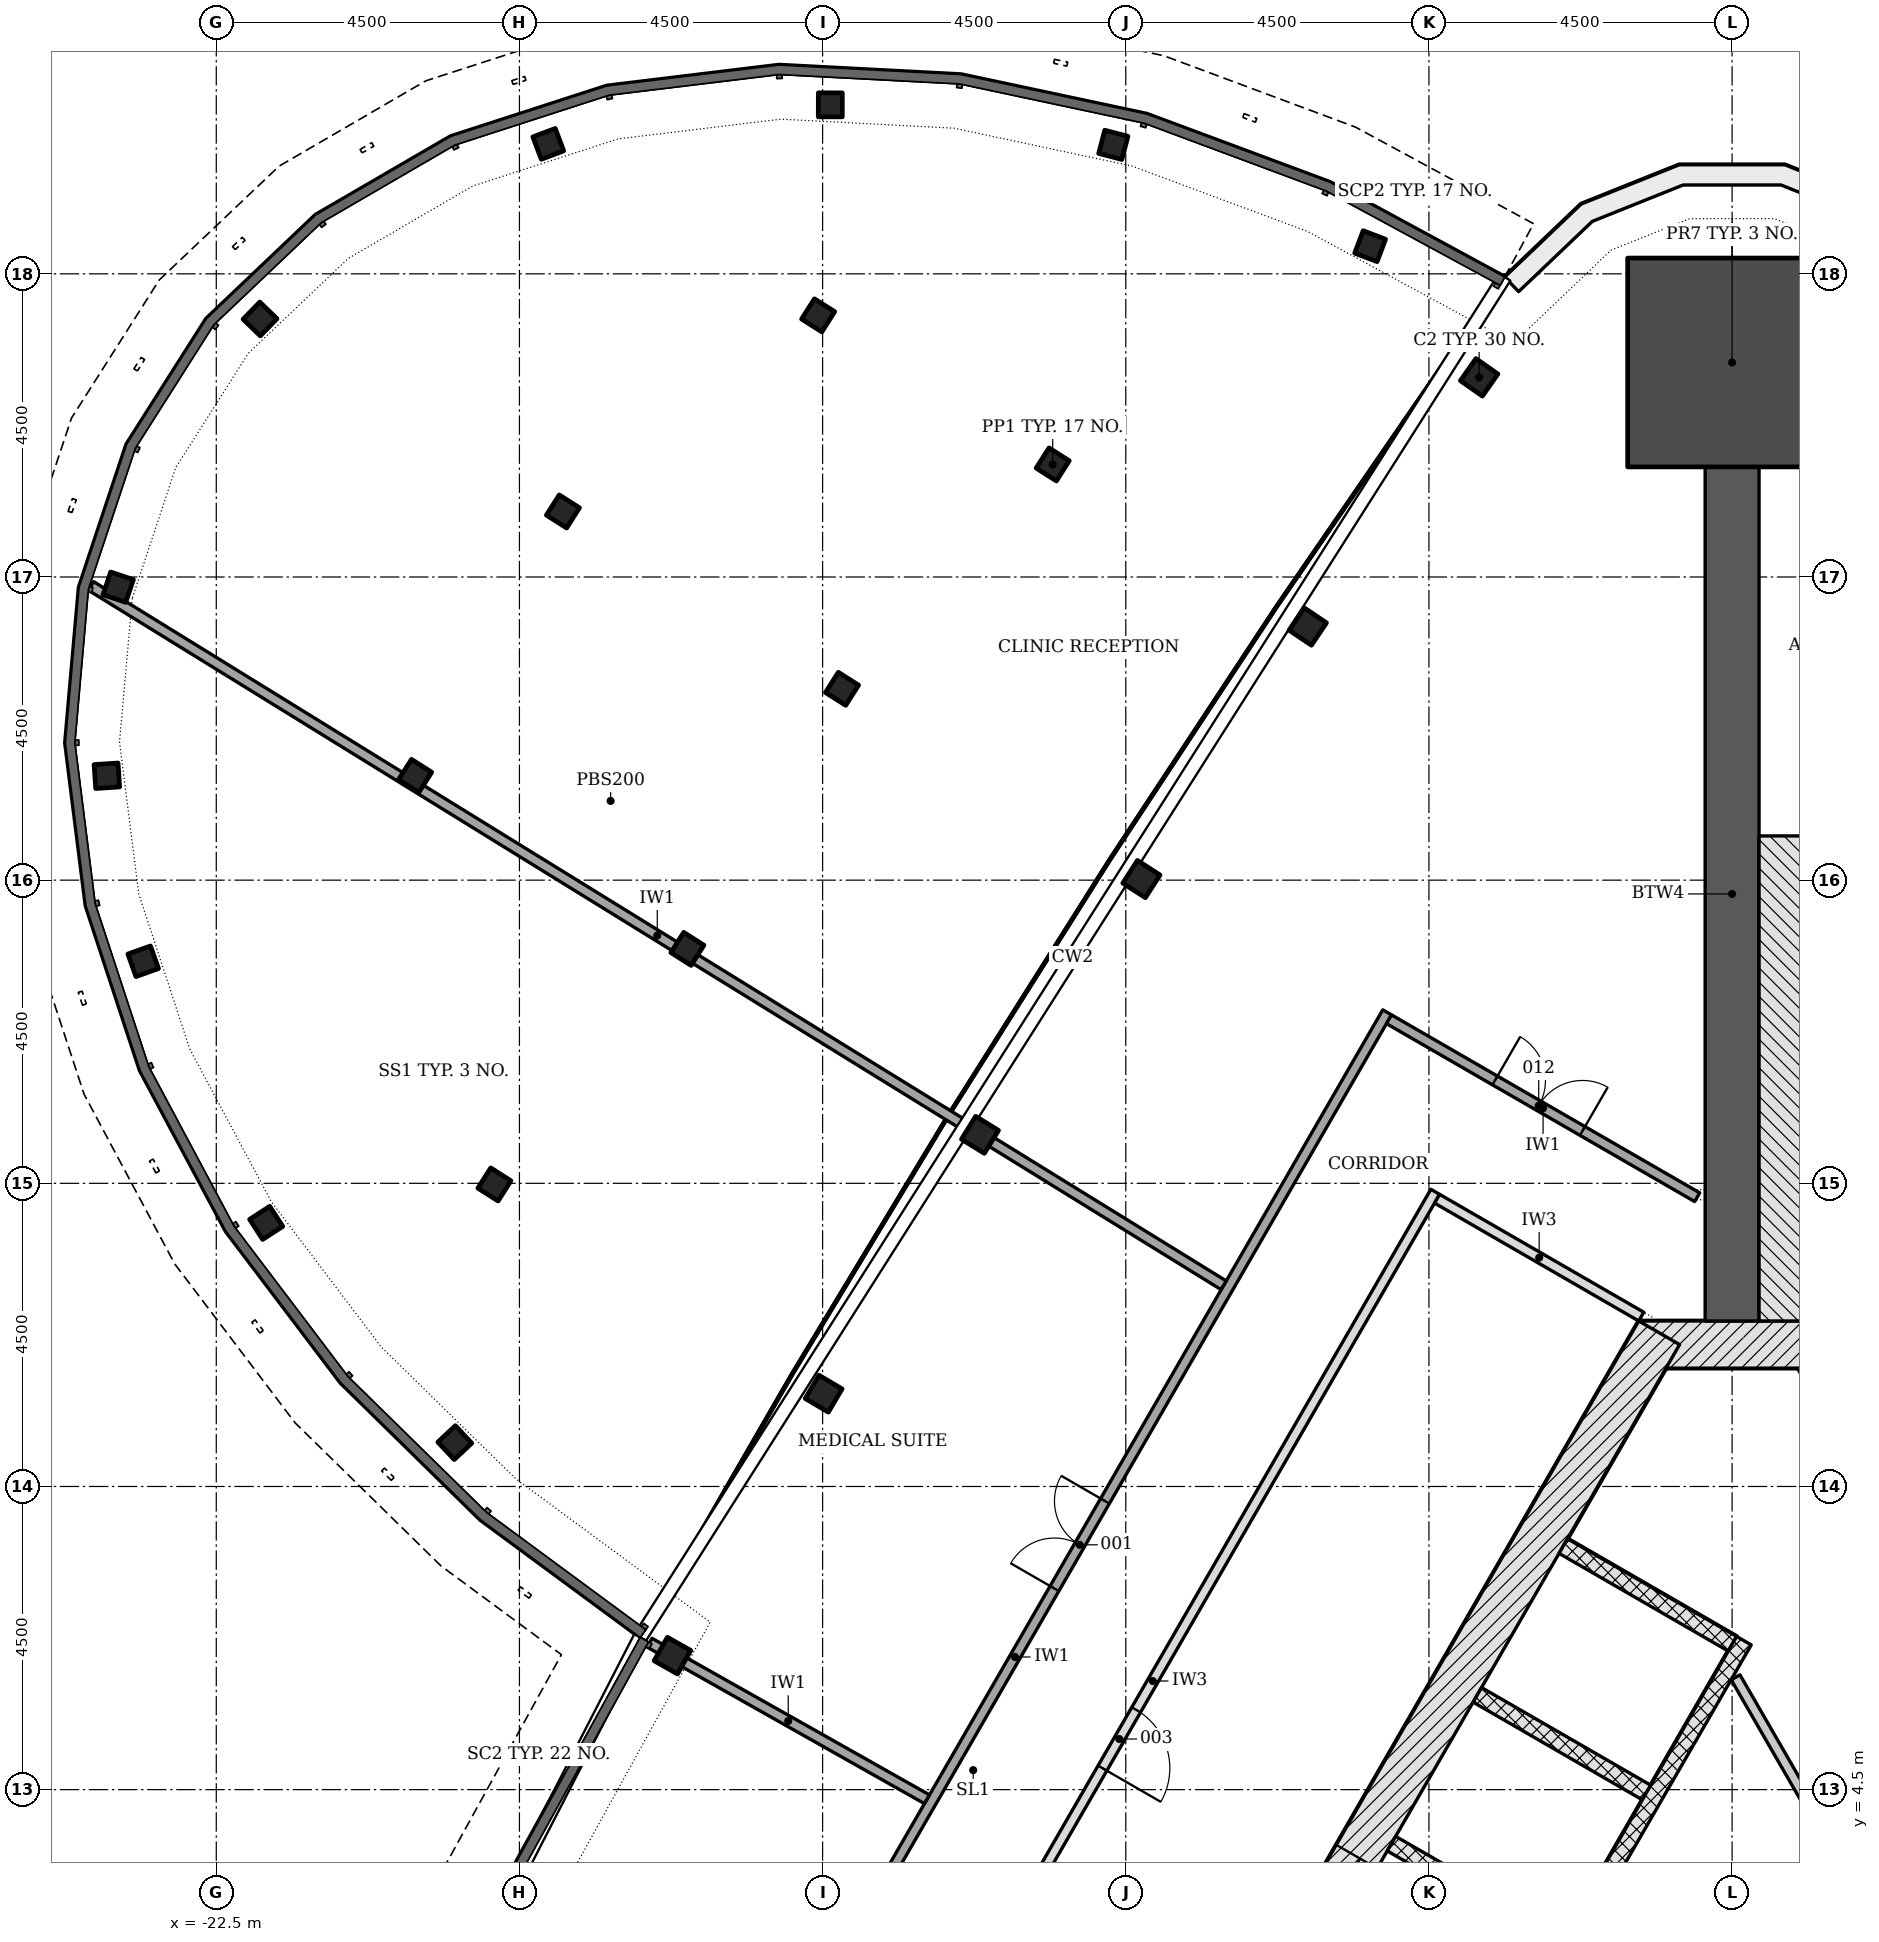
"""IFC4 building model, lengths in metres.
Left out: names, types, materials, properties, quantities, classifications, styles, units other than length and angle.
Written with IfcOpenShell. Run it as: python <this file> out.ifc"""

import sys

from ifc_helpers import new_model, si_unit, direction, frame, frame_2d, origin, origin_2d, place, context, subcontext, project, spatial, polyline, rectangle, hollow_rectangle, i_section, outline, extrude, element, fill, save


model = new_model("IFC4")
c1 = context("Model", 3, precision=1e-05, world=origin(), true_north=direction((0.0, 1.0)))
c2 = subcontext(c1, "Body", "Model", "MODEL_VIEW")
j1 = project(units=[si_unit("LENGTHUNIT", "METRE"), si_unit("PLANEANGLEUNIT", "RADIAN")], contexts=[c1])
p1 = place(None, origin())
s1 = spatial("IfcSite", under=j1, at=p1, CompositionType="ELEMENT")
p2 = place(p1, origin())
s2 = spatial("IfcBuilding", under=s1, at=p2, CompositionType="ELEMENT")
p3 = place(p2, frame((0.0, 0.0, 91.5)))
s3 = spatial("IfcBuildingStorey", under=s2, at=p3, CompositionType="ELEMENT", Elevation=91.5)
p4 = place(p3, frame((10.311, -4.703, -0.2), z_axis=(0.0, 0.0, 1.0), x_axis=(-0.500001446645, 0.866024568562, 0.0)))
e1 = element("IfcWall", 1, at=p4, inside=s3, PredefinedType="SHEAR", context=c2, shape_type="SweptSolid", body=[
    extrude(rectangle(XDim=18.458, YDim=0.7, at=frame_2d((9.229, 0.0))), origin(), (0.0, 0.0, 1.0), 3.6),
])
p5 = place(p4, frame((8.7, 0.0, 0.2)))
e2 = element("IfcOpeningElement", 2, at=p5, cuts=e1, PredefinedType="OPENING", context=c2, shape_type="SweptSolid", body=[
    extrude(rectangle(XDim=1.0, YDim=2.1, at=frame_2d((0.5, 1.05))), frame((0.0, 0.36, 0.0), z_axis=(0.0, -1.0, 0.0), x_axis=(1.0, 0.0, 0.0)), (0.0, 0.0, 1.0), 0.72),
])
p6 = place(p4, frame((3.99, 0.0, 0.2)))
e3 = element("IfcOpeningElement", 3, at=p6, cuts=e1, PredefinedType="OPENING", context=c2, shape_type="SweptSolid", body=[
    extrude(rectangle(XDim=0.9, YDim=2.1, at=frame_2d((0.45, 1.05))), frame((0.0, 0.36, 0.0), z_axis=(0.0, -1.0, 0.0), x_axis=(1.0, 0.0, 0.0)), (0.0, 0.0, 1.0), 0.72),
])
p7 = place(p4, frame((13.539, 0.0, 0.2)))
e4 = element("IfcOpeningElement", 4, at=p7, cuts=e1, PredefinedType="OPENING", context=c2, shape_type="SweptSolid", body=[
    extrude(rectangle(XDim=0.9, YDim=2.1, at=frame_2d((0.45, 1.05))), frame((0.0, 0.36, 0.0), z_axis=(0.0, -1.0, 0.0), x_axis=(1.0, 0.0, 0.0)), (0.0, 0.0, 1.0), 0.72),
])
p8 = place(p3, frame((1.386, 11.106, -0.2), z_axis=(0.0, 0.0, 1.0), x_axis=(-1.0, 0.0, 0.0)))
e5 = element("IfcWall", 5, at=p8, inside=s3, PredefinedType="SHEAR", context=c2, shape_type="SweptSolid", body=[
    extrude(rectangle(XDim=2.771, YDim=0.7, at=frame_2d((1.386, 0.0))), origin(), (0.0, 0.0, 1.0), 3.6),
])
p9 = place(p3, frame((-1.083, 11.281, -0.2), z_axis=(0.0, 0.0, 1.0), x_axis=(-0.500001446645, -0.866024568562, 0.0)))
e6 = element("IfcWall", 6, at=p9, inside=s3, PredefinedType="SHEAR", context=c2, shape_type="SweptSolid", body=[
    extrude(rectangle(XDim=18.458, YDim=0.7, at=frame_2d((9.229, 0.0))), origin(), (0.0, 0.0, 1.0), 3.6),
])
p10 = place(p9, frame((8.979, 0.0, 0.2)))
e7 = element("IfcOpeningElement", 7, at=p10, cuts=e6, PredefinedType="OPENING", context=c2, shape_type="SweptSolid", body=[
    extrude(rectangle(XDim=1.2, YDim=2.1, at=frame_2d((0.6, 1.05))), frame((0.0, 0.36, 0.0), z_axis=(0.0, -1.0, 0.0), x_axis=(1.0, 0.0, 0.0)), (0.0, 0.0, 1.0), 0.72),
])
p11 = place(p9, frame((11.029, 0.0, 0.2)))
e8 = element("IfcOpeningElement", 8, at=p11, cuts=e6, PredefinedType="OPENING", context=c2, shape_type="SweptSolid", body=[
    extrude(rectangle(XDim=1.2, YDim=2.1, at=frame_2d((0.6, 1.05))), frame((0.0, 0.36, 0.0), z_axis=(0.0, -1.0, 0.0), x_axis=(1.0, 0.0, 0.0)), (0.0, 0.0, 1.0), 0.72),
])
p12 = place(p3, frame((0.0, 11.456, -0.2), z_axis=(0.0, 0.0, 1.0), x_axis=(0.0, 1.0, 0.0)))
e9 = element("IfcWall", 9, at=p12, inside=s3, PredefinedType="SHEAR", context=c2, shape_type="SweptSolid", body=[
    extrude(rectangle(XDim=12.678, YDim=0.8, at=frame_2d((6.339, 0.0))), origin(), (0.0, 0.0, 1.0), 3.6),
])
p13 = place(p3, frame((0.0, 25.684, -0.2), z_axis=(0.0, 0.0, 1.0), x_axis=(0.0, 1.0, 0.0)))
e10 = element("IfcColumn", 10, at=p13, inside=s3, PredefinedType="COLUMN", context=c2, shape_type="SweptSolid", body=[
    extrude(rectangle(XDim=3.1, YDim=3.1, at=origin_2d()), origin(), (0.0, 0.0, 1.0), 3.6),
])
for number, where, z_axis, x_axis in (
    (11, (-3.755, 25.464, -0.2), (0.0, 0.0, 1.0), (-0.575, -0.818, 0.0)),
    (12, (-6.298, 21.765, -0.2), (0.0, 0.0, 1.0), (-0.558, -0.83, 0.0)),
    (13, (-8.768, 18.016, -0.2), (0.0, 0.0, 1.0), (-0.542, -0.84, 0.0)),
    (14, (-11.164, 14.22, -0.2), (0.0, 0.0, 1.0), (-0.525, -0.851, 0.0)),
    (15, (-13.484, 10.377, -0.2), (0.0, 0.0, 1.0), (-0.508, -0.861, 0.0)),
    (16, (-15.729, 6.49, -0.2), (0.0, 0.0, 1.0), (-0.491, -0.871, 0.0)),
):
    element("IfcColumn", number, at=place(p3, frame(where, z_axis=z_axis, x_axis=x_axis)), inside=s3, PredefinedType="COLUMN", context=c2, shape_type="SweptSolid", body=[
        extrude(i_section(OverallWidth=0.401, OverallDepth=0.399, WebThickness=0.025, FlangeThickness=0.04, FilletRadius=0.015, at=origin_2d()), origin(), (0.0, 0.0, 1.0), 3.6),
    ])
for number, where, z_axis, x_axis in (
    (17, (-10.084, 24.171, -0.2), (0.0, 0.0, 1.0), (-0.844, 0.536, 0.0)),
    (18, (-13.566, 26.384, -0.2), (0.0, 0.0, 1.0), (-0.844, 0.536, 0.0)),
    (19, (-13.212, 20.84, -0.2), (0.0, 0.0, 1.0), (-0.844, 0.536, 0.0)),
    (20, (-17.354, 23.473, -0.2), (0.0, 0.0, 1.0), (-0.844, 0.536, 0.0)),
    (21, (-15.507, 16.98, -0.2), (0.0, 0.0, 1.0), (-0.844, 0.536, 0.0)),
    (22, (-19.548, 19.548, -0.2), (0.0, 0.0, 1.0), (-0.844, 0.536, 0.0)),
    (23, (-18.372, 13.483, -0.2), (0.0, 0.0, 1.0), (-0.844, 0.536, 0.0)),
    (24, (-5.373, 27.41, -0.2), (0.0, 0.0, 1.0), (-0.935, 0.355, 0.0)),
    (25, (-9.185, 28.915, -0.2), (0.0, 0.0, 1.0), (-0.967, 0.253, 0.0)),
    (26, (-13.386, 29.509, -0.2), (0.0, 0.0, 1.0), (-1.0, 0.002, 0.0)),
    (27, (-17.572, 28.929, -0.2), (0.0, 0.0, 1.0), (-0.936, -0.352, 0.0)),
    (28, (-21.851, 26.33, -0.2), (0.0, 0.0, 1.0), (-0.696, -0.718, 0.0)),
    (29, (-23.956, 22.349, -0.2), (0.0, 0.0, 1.0), (-0.318, -0.948, 0.0)),
    (30, (-24.124, 19.55, -0.2), (0.0, 0.0, 1.0), (0.067, -0.998, 0.0)),
    (31, (-23.585, 16.796, -0.2), (0.0, 0.0, 1.0), (0.336, -0.942, 0.0)),
    (32, (-21.759, 12.913, -0.2), (0.0, 0.0, 1.0), (0.543, -0.839, 0.0)),
    (33, (-18.959, 9.651, -0.2), (0.0, 0.0, 1.0), (0.684, -0.73, 0.0)),
):
    element("IfcColumn", number, at=place(p3, frame(where, z_axis=z_axis, x_axis=x_axis)), inside=s3, PredefinedType="COLUMN", context=c2, shape_type="SweptSolid", body=[
        extrude(hollow_rectangle(XDim=0.356, YDim=0.356, WallThickness=0.013, at=origin_2d()), origin(), (0.0, 0.0, 1.0), 3.6),
    ])
p14 = place(p3, origin())
e34 = element("IfcWall", 34, at=p14, inside=s3, PredefinedType="NOTDEFINED", context=c2, shape_type="SweptSolid", body=[
    extrude(outline(polyline([(4.205, 25.78), (3.375, 26.953), (2.24, 28.035), (0.784, 28.619), (-0.784, 28.619), (-2.24, 28.035), (-3.375, 26.953), (-3.168, 26.736), (-2.075, 27.779), (-0.727, 28.319), (0.727, 28.319), (2.075, 27.779), (3.147, 26.756), (3.96, 25.606), (4.205, 25.78)])), origin(), (0.0, 0.0, 1.0), 3.3),
])
p15 = place(p3, frame((-2.506, 8.115, -0.2), z_axis=(0.0, 0.0, 1.0), x_axis=(0.865996321171, -0.50005036918, 0.0)))
e35 = element("IfcWall", 35, at=p15, inside=s3, PredefinedType="PARTITIONING", context=c2, shape_type="SweptSolid", body=[
    extrude(rectangle(XDim=2.9, YDim=0.25, at=frame_2d((1.45, 0.0))), origin(), (0.0, 0.0, 1.0), 3.6),
])
for number, where, z_axis, x_axis in (
    (36, (-3.781, 5.907, -0.2), (0.0, 0.0, 1.0), (0.866, -0.5, 0.0)),
    (37, (-5.056, 3.699, -0.2), (0.0, 0.0, 1.0), (0.866, -0.5, 0.0)),
):
    element("IfcWall", number, at=place(p3, frame(where, z_axis=z_axis, x_axis=x_axis)), inside=s3, PredefinedType="PARTITIONING", context=c2, shape_type="SweptSolid", body=[
        extrude(rectangle(XDim=2.9, YDim=0.25, at=frame_2d((1.45, 0.0))), origin(), (0.0, 0.0, 1.0), 3.6),
    ])
p16 = place(p3, frame((0.176, 6.711, 0.0), z_axis=(0.0, 0.0, 1.0), x_axis=(-0.500004227369, -0.866022963098, 0.0)))
e38 = element("IfcWall", 38, at=p16, inside=s3, PredefinedType="PARTITIONING", context=c2, shape_type="SweptSolid", body=[
    extrude(rectangle(XDim=11.8, YDim=0.25, at=frame_2d((5.9, 0.0))), origin(), (0.0, 0.0, 1.0), 3.4),
])
p17 = place(p3, frame((-4.523, -1.807, 0.0), z_axis=(0.0, 0.0, 1.0), x_axis=(0.866030300338, 0.499991518824, 0.0)))
e39 = element("IfcWall", 39, at=p17, inside=s3, PredefinedType="PARTITIONING", context=c2, shape_type="SweptSolid", body=[
    extrude(rectangle(XDim=11.049, YDim=0.15, at=frame_2d((5.524, 0.0))), origin(), (0.0, 0.0, 1.0), 3.4),
])
p18 = place(p17, frame((3.525, 0.0, 0.0)))
e40 = element("IfcOpeningElement", 40, at=p18, cuts=e39, PredefinedType="OPENING", context=c2, shape_type="SweptSolid", body=[
    extrude(rectangle(XDim=0.9, YDim=2.1, at=frame_2d((0.45, 1.05))), frame((0.0, 0.085, 0.0), z_axis=(0.0, -1.0, 0.0), x_axis=(1.0, 0.0, 0.0)), (0.0, 0.0, 1.0), 0.17),
])
p19 = place(p3, frame((2.174, 2.492, 0.0), z_axis=(0.0, 0.0, 1.0), x_axis=(-0.499999641798, 0.866025610592, 0.0)))
e41 = element("IfcWall", 41, at=p19, inside=s3, PredefinedType="PARTITIONING", context=c2, shape_type="SweptSolid", body=[
    extrude(rectangle(XDim=4.244, YDim=0.15, at=frame_2d((2.122, 0.0))), origin(), (0.0, 0.0, 1.0), 3.4),
])
p20 = place(p3, frame((0.993, 11.456, -0.2), z_axis=(0.0, 0.0, 1.0), x_axis=(0.0, 1.0, 0.0)))
e42 = element("IfcWall", 42, at=p20, inside=s3, PredefinedType="SHEAR", context=c2, shape_type="SweptSolid", body=[
    extrude(rectangle(XDim=7.2, YDim=1.186, at=frame_2d((3.6, 0.0))), origin(), (0.0, 0.0, 1.0), 3.6),
])
p21 = place(p3, frame((-16.169, -3.099, 0.0), z_axis=(0.0, 0.0, 1.0), x_axis=(0.499999805269, 0.866025516212, 0.0)))
e43 = element("IfcWall", 43, at=p21, inside=s3, PredefinedType="PARTITIONING", context=c2, shape_type="SweptSolid", body=[
    extrude(rectangle(XDim=22.097, YDim=0.15, at=frame_2d((11.049, 0.0))), origin(), (0.0, 0.0, 1.0), 2.778),
])
p22 = place(p21, frame((12.221, 0.0, 0.0)))
e44 = element("IfcOpeningElement", 44, at=p22, cuts=e43, PredefinedType="OPENING", context=c2, shape_type="SweptSolid", body=[
    extrude(rectangle(XDim=1.5, YDim=2.1, at=frame_2d((0.75, 1.05))), frame((0.0, 0.085, 0.0), z_axis=(0.0, -1.0, 0.0), x_axis=(1.0, 0.0, 0.0)), (0.0, 0.0, 1.0), 0.17),
])
p23 = place(p21, frame((3.403, 0.0, 0.0)))
e45 = element("IfcOpeningElement", 45, at=p23, cuts=e43, PredefinedType="OPENING", context=c2, shape_type="SweptSolid", body=[
    extrude(rectangle(XDim=1.5, YDim=2.1, at=frame_2d((0.75, 1.05))), frame((0.0, 0.085, 0.0), z_axis=(0.0, -1.0, 0.0), x_axis=(1.0, 0.0, 0.0)), (0.0, 0.0, 1.0), 0.17),
])
p24 = place(p3, frame((-4.407, 13.374, 0.0), z_axis=(0.0, 0.0, 1.0), x_axis=(-0.499997181693, -0.866027030928, 0.0)))
e46 = element("IfcWall", 46, at=p24, inside=s3, PredefinedType="PARTITIONING", context=c2, shape_type="SweptSolid", body=[
    extrude(rectangle(XDim=16.77, YDim=0.15, at=frame_2d((8.385, 0.0))), origin(), (0.0, 0.0, 1.0), 2.778),
])
p25 = place(p24, frame((8.879, 0.0, 0.0)))
e47 = element("IfcOpeningElement", 47, at=p25, cuts=e46, PredefinedType="OPENING", context=c2, shape_type="SweptSolid", body=[
    extrude(rectangle(XDim=1.0, YDim=2.1, at=frame_2d((0.5, 1.05))), frame((0.0, 0.085, 0.0), z_axis=(0.0, -1.0, 0.0), x_axis=(1.0, 0.0, 0.0)), (0.0, 0.0, 1.0), 0.17),
])
p26 = place(p3, frame((-5.093, 15.935, 0.0), z_axis=(0.0, 0.0, 1.0), x_axis=(0.866033195618, -0.499986503906, 0.0)))
e48 = element("IfcWall", 48, at=p26, inside=s3, PredefinedType="PARTITIONING", context=c2, shape_type="SweptSolid", body=[
    extrude(rectangle(XDim=5.282, YDim=0.15, at=frame_2d((2.641, 0.0))), origin(), (0.0, 0.0, 1.0), 3.4),
])
p27 = place(p26, frame((1.816, 0.0, 0.0)))
e49 = element("IfcOpeningElement", 49, at=p27, cuts=e48, PredefinedType="OPENING", context=c2, shape_type="SweptSolid", body=[
    extrude(rectangle(XDim=1.5, YDim=2.1, at=frame_2d((0.75, 1.05))), frame((0.0, 0.085, 0.0), z_axis=(0.0, -1.0, 0.0), x_axis=(1.0, 0.0, 0.0)), (0.0, 0.0, 1.0), 0.17),
])
p28 = place(p3, frame((-4.379, 13.271, 0.0), z_axis=(0.0, 0.0, 1.0), x_axis=(0.866019471182, -0.500010275428, 0.0)))
e50 = element("IfcWall", 50, at=p28, inside=s3, PredefinedType="PARTITIONING", context=c2, shape_type="SweptSolid", body=[
    extrude(rectangle(XDim=3.5, YDim=0.15, at=frame_2d((1.75, 0.0))), origin(), (0.0, 0.0, 1.0), 3.4),
])
p29 = place(p3, frame((-24.361, 22.368, 0.0), z_axis=(0.0, 0.0, 1.0), x_axis=(0.850884423776, -0.525352926494, 0.0)))
e51 = element("IfcWall", 51, at=p29, inside=s3, PredefinedType="PARTITIONING", context=c2, shape_type="SweptSolid", body=[
    extrude(rectangle(XDim=19.759, YDim=0.15, at=frame_2d((9.879, 0.0))), origin(), (0.0, 0.0, 1.0), 2.778),
])
p30 = place(p3, frame((-16.069, 6.681, 0.0), z_axis=(0.0, 0.0, 1.0), x_axis=(0.87091272742, -0.49143770838, 0.0)))
e52 = element("IfcWall", 52, at=p30, inside=s3, PredefinedType="PARTITIONING", context=c2, shape_type="SweptSolid", body=[
    extrude(rectangle(XDim=4.728, YDim=0.15, at=frame_2d((2.364, 0.0))), origin(), (0.0, 0.0, 1.0), 2.778),
])
p31 = place(p10, origin())
e53 = element("IfcDoor", 53, at=p31, inside=s3, OperationType="DOUBLE_DOOR_SLIDING", PredefinedType="DOOR", context=c2, shape_type="SweptSolid", body=[
    extrude(rectangle(XDim=1.2, YDim=2.1, at=frame_2d((0.6, 1.05))), frame((0.0, 0.025, 0.0), z_axis=(0.0, -1.0, 0.0), x_axis=(1.0, 0.0, 0.0)), (0.0, 0.0, 1.0), 0.05),
])
fill(e7, e53)
p32 = place(p22, origin())
e54 = element("IfcDoor", 54, at=p32, inside=s3, OperationType="DOUBLE_DOOR_SINGLE_SWING", PredefinedType="DOOR", context=c2, shape_type="SweptSolid", body=[
    extrude(rectangle(XDim=1.5, YDim=2.1, at=frame_2d((0.75, 1.05))), frame((0.0, 0.025, 0.0), z_axis=(0.0, -1.0, 0.0), x_axis=(1.0, 0.0, 0.0)), (0.0, 0.0, 1.0), 0.05),
])
fill(e44, e54)
p33 = place(p25, origin())
e55 = element("IfcDoor", 55, at=p33, inside=s3, OperationType="SINGLE_SWING_RIGHT", PredefinedType="DOOR", context=c2, shape_type="SweptSolid", body=[
    extrude(rectangle(XDim=1.0, YDim=2.1, at=frame_2d((0.5, 1.05))), frame((0.0, 0.025, 0.0), z_axis=(0.0, -1.0, 0.0), x_axis=(1.0, 0.0, 0.0)), (0.0, 0.0, 1.0), 0.05),
])
fill(e47, e55)
p34 = place(p27, origin())
e56 = element("IfcDoor", 56, at=p34, inside=s3, OperationType="DOUBLE_DOOR_SINGLE_SWING", PredefinedType="DOOR", context=c2, shape_type="SweptSolid", body=[
    extrude(rectangle(XDim=1.5, YDim=2.1, at=frame_2d((0.75, 1.05))), frame((0.0, 0.025, 0.0), z_axis=(0.0, -1.0, 0.0), x_axis=(1.0, 0.0, 0.0)), (0.0, 0.0, 1.0), 0.05),
])
fill(e49, e56)
save(model, sys.argv[1])
